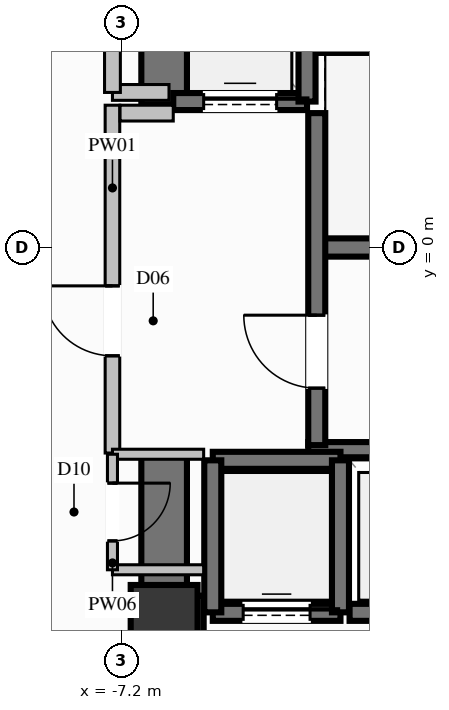
"""IFC4 building model, lengths in metres.
Left out: names, types, materials, properties, quantities, classifications, styles, units other than length and angle.
Written with IfcOpenShell. Run it as: python <this file> out.ifc"""

import sys

from ifc_helpers import new_model, si_unit, direction, frame, frame_2d, origin, origin_2d, place, context, subcontext, project, spatial, rectangle, extrude, element, fill, save


model = new_model("IFC4")
c1 = context("Model", 3, precision=1e-05, world=origin(), true_north=direction((0.0, 1.0)))
c2 = subcontext(c1, "Body", "Model", "MODEL_VIEW")
j1 = project(units=[si_unit("LENGTHUNIT", "METRE"), si_unit("PLANEANGLEUNIT", "RADIAN")], contexts=[c1])
p1 = place(None, origin())
s1 = spatial("IfcSite", under=j1, at=p1, CompositionType="ELEMENT")
p2 = place(p1, origin())
s2 = spatial("IfcBuilding", under=s1, at=p2, CompositionType="ELEMENT")
p3 = place(p2, frame((0.0, 0.0, 64.4)))
s3 = spatial("IfcBuildingStorey", under=s2, at=p3, CompositionType="ELEMENT", Elevation=64.4)
p4 = place(p3, frame((-6.5, -6.1, 0.0), z_axis=(0.0, 0.0, 1.0), x_axis=(1.0, 0.0, 0.0)))
e1 = element("IfcColumn", 1, at=p4, inside=s3, PredefinedType="COLUMN", context=c2, shape_type="SweptSolid", body=[
    extrude(rectangle(XDim=1.1, YDim=1.1, at=origin_2d()), origin(), (0.0, 0.0, 1.0), 3.6),
])
p5 = place(p3, frame((-3.99, 0.0, 0.0), z_axis=(0.0, 0.0, 1.0), x_axis=(1.0, 0.0, 0.0)))
e2 = element("IfcWall", 2, at=p5, inside=s3, PredefinedType="SHEAR", context=c2, shape_type="SweptSolid", body=[
    extrude(rectangle(XDim=7.98, YDim=0.3, at=frame_2d((3.99, 0.0))), origin(), (0.0, 0.0, 1.0), 3.6),
])
for number, where, z_axis, x_axis in (
    (3, (-4.13, -3.325, 0.0), (0.0, 0.0, 1.0), (1.0, 0.0, 0.0)),
    (4, (-4.13, 3.325, 0.0), (0.0, 0.0, 1.0), (1.0, 0.0, 0.0)),
):
    element("IfcWall", number, at=place(p3, frame(where, z_axis=z_axis, x_axis=x_axis)), inside=s3, PredefinedType="SOLIDWALL", context=c2, shape_type="SweptSolid", body=[
        extrude(rectangle(XDim=8.26, YDim=0.25, at=frame_2d((4.13, 0.0))), origin(), (0.0, 0.0, 1.0), 3.6),
    ])
p6 = place(p3, frame((-6.125, -6.1, 0.0), z_axis=(0.0, 0.0, 1.0), x_axis=(1.0, 0.0, 0.0)))
e5 = element("IfcWall", 5, at=p6, inside=s3, PredefinedType="SHEAR", context=c2, shape_type="SweptSolid", body=[
    extrude(rectangle(XDim=0.275, YDim=0.75, at=frame_2d((0.137, 0.0))), origin(), (0.0, 0.0, 1.0), 3.6),
])
p7 = place(p3, frame((-6.5, 2.35, 0.0), z_axis=(0.0, 0.0, 1.0), x_axis=(0.0, 1.0, 0.0)))
e6 = element("IfcWall", 6, at=p7, inside=s3, PredefinedType="SHEAR", context=c2, shape_type="SweptSolid", body=[
    extrude(rectangle(XDim=4.125, YDim=0.75, at=frame_2d((2.062, 0.0))), origin(), (0.0, 0.0, 1.0), 3.6),
])
p8 = place(p3, frame((-6.5, -6.475, 0.0), z_axis=(0.0, 0.0, 1.0), x_axis=(0.0, 1.0, 0.0)))
e7 = element("IfcWall", 7, at=p8, inside=s3, PredefinedType="SHEAR", context=c2, shape_type="SweptSolid", body=[
    extrude(rectangle(XDim=3.125, YDim=0.75, at=frame_2d((1.562, 0.0))), origin(), (0.0, 0.0, 1.0), 3.6),
])
p9 = place(p3, frame((-5.7, -6.0, 0.0), z_axis=(0.0, 0.0, 1.0), x_axis=(1.0, 0.0, 0.0)))
e8 = element("IfcWall", 8, at=p9, inside=s3, PredefinedType="SOLIDWALL", context=c2, shape_type="SweptSolid", body=[
    extrude(rectangle(XDim=2.1, YDim=0.28, at=frame_2d((1.05, 0.0))), origin(), (0.0, 0.0, 1.0), 3.34),
])
p10 = place(p9, frame((0.5, 0.0, 0.0)))
e9 = element("IfcOpeningElement", 9, at=p10, cuts=e8, PredefinedType="OPENING", context=c2, shape_type="SweptSolid", body=[
    extrude(rectangle(XDim=1.1, YDim=2.2, at=frame_2d((0.55, 1.1))), frame((0.0, 0.15, 0.0), z_axis=(0.0, -1.0, 0.0), x_axis=(1.0, 0.0, 0.0)), (0.0, 0.0, 1.0), 0.3),
])
p11 = place(p3, frame((-3.6, -3.5, 0.0), z_axis=(0.0, 0.0, 1.0), x_axis=(-1.0, 0.0, 0.0)))
e10 = element("IfcWall", 10, at=p11, inside=s3, PredefinedType="SOLIDWALL", context=c2, shape_type="SweptSolid", body=[
    extrude(rectangle(XDim=2.1, YDim=0.28, at=frame_2d((1.05, 0.0))), origin(), (0.0, 0.0, 1.0), 3.34),
])
for number, where, z_axis, x_axis in (
    (11, (-5.7, -3.5, 0.0), (0.0, 0.0, 1.0), (0.0, -1.0, 0.0)),
    (12, (-3.6, -6.0, 0.0), (0.0, 0.0, 1.0), (0.0, 1.0, 0.0)),
):
    element("IfcWall", number, at=place(p3, frame(where, z_axis=z_axis, x_axis=x_axis)), inside=s3, PredefinedType="SOLIDWALL", context=c2, shape_type="SweptSolid", body=[
        extrude(rectangle(XDim=2.5, YDim=0.28, at=frame_2d((1.25, 0.0))), origin(), (0.0, 0.0, 1.0), 3.34),
    ])
p12 = place(p3, frame((-3.45, -6.0, 0.0), z_axis=(0.0, 0.0, 1.0), x_axis=(1.0, 0.0, 0.0)))
e13 = element("IfcWall", 13, at=p12, inside=s3, PredefinedType="SOLIDWALL", context=c2, shape_type="SweptSolid", body=[
    extrude(rectangle(XDim=2.1, YDim=0.28, at=frame_2d((1.05, 0.0))), origin(), (0.0, 0.0, 1.0), 3.34),
])
p13 = place(p12, frame((0.5, 0.0, 0.0)))
e14 = element("IfcOpeningElement", 14, at=p13, cuts=e13, PredefinedType="OPENING", context=c2, shape_type="SweptSolid", body=[
    extrude(rectangle(XDim=1.1, YDim=2.2, at=frame_2d((0.55, 1.1))), frame((0.0, 0.15, 0.0), z_axis=(0.0, -1.0, 0.0), x_axis=(1.0, 0.0, 0.0)), (0.0, 0.0, 1.0), 0.3),
])
p14 = place(p3, frame((-6.35, 2.4, 0.0), z_axis=(0.0, 0.0, 1.0), x_axis=(1.0, 0.0, 0.0)))
e15 = element("IfcWall", 15, at=p14, inside=s3, PredefinedType="SOLIDWALL", context=c2, shape_type="SweptSolid", body=[
    extrude(rectangle(XDim=2.2, YDim=0.28, at=frame_2d((1.1, 0.0))), origin(), (0.0, 0.0, 1.0), 3.34),
])
p15 = place(p14, frame((0.5, 0.0, 0.0)))
e16 = element("IfcOpeningElement", 16, at=p15, cuts=e15, PredefinedType="OPENING", context=c2, shape_type="SweptSolid", body=[
    extrude(rectangle(XDim=1.2, YDim=2.2, at=frame_2d((0.6, 1.1))), frame((0.0, 0.15, 0.0), z_axis=(0.0, -1.0, 0.0), x_axis=(1.0, 0.0, 0.0)), (0.0, 0.0, 1.0), 0.3),
])
p16 = place(p3, frame((-4.15, 2.4, 0.0), z_axis=(0.0, 0.0, 1.0), x_axis=(0.0, 1.0, 0.0)))
e17 = element("IfcWall", 17, at=p16, inside=s3, PredefinedType="SOLIDWALL", context=c2, shape_type="SweptSolid", body=[
    extrude(rectangle(XDim=2.7, YDim=0.28, at=frame_2d((1.35, 0.0))), origin(), (0.0, 0.0, 1.0), 3.34),
])
p17 = place(p3, frame((-3.99, -3.25, 0.0), z_axis=(0.0, 0.0, 1.0), x_axis=(0.0, 1.0, 0.0)))
e18 = element("IfcWall", 18, at=p17, inside=s3, PredefinedType="SOLIDWALL", context=c2, shape_type="SweptSolid", body=[
    extrude(rectangle(XDim=5.46, YDim=0.28, at=frame_2d((2.73, 0.0))), origin(), (0.0, 0.0, 1.0), 3.34),
])
p18 = place(p17, frame((0.937, 0.0, 0.0)))
e19 = element("IfcOpeningElement", 19, at=p18, cuts=e18, PredefinedType="OPENING", context=c2, shape_type="SweptSolid", body=[
    extrude(rectangle(XDim=1.2, YDim=2.2, at=frame_2d((0.6, 1.1))), frame((0.0, 0.15, 0.0), z_axis=(0.0, -1.0, 0.0), x_axis=(1.0, 0.0, 0.0)), (0.0, 0.0, 1.0), 0.3),
])
p19 = place(p3, frame((-7.35, -3.38, 0.0), z_axis=(0.0, 0.0, 1.0), x_axis=(0.0, 1.0, 0.0)))
e20 = element("IfcWall", 20, at=p19, inside=s3, PredefinedType="PARTITIONING", context=c2, shape_type="SweptSolid", body=[
    extrude(rectangle(XDim=5.72, YDim=0.24, at=frame_2d((2.86, 0.0))), origin(), (0.0, 0.0, 1.0), 2.425),
])
p20 = place(p19, frame((1.599, 0.0, 0.0)))
e21 = element("IfcOpeningElement", 21, at=p20, cuts=e20, PredefinedType="OPENING", context=c2, shape_type="SweptSolid", body=[
    extrude(rectangle(XDim=1.15, YDim=2.2, at=frame_2d((0.575, 1.1))), frame((0.0, 0.13, 0.0), z_axis=(0.0, -1.0, 0.0), x_axis=(1.0, 0.0, 0.0)), (0.0, 0.0, 1.0), 0.26),
])
p21 = place(p3, frame((-7.225, 2.21, 0.0), z_axis=(0.0, 0.0, 1.0), x_axis=(1.0, 0.0, 0.0)))
e22 = element("IfcWall", 22, at=p21, inside=s3, PredefinedType="PARTITIONING", context=c2, shape_type="SweptSolid", body=[
    extrude(rectangle(XDim=0.875, YDim=0.26, at=frame_2d((0.438, 0.0))), origin(), (0.0, 0.0, 1.0), 3.34),
])
p22 = place(p3, frame((-7.35, 2.55, 0.0), z_axis=(0.0, 0.0, 1.0), x_axis=(1.0, 0.0, 0.0)))
e23 = element("IfcWall", 23, at=p22, inside=s3, PredefinedType="PARTITIONING", context=c2, shape_type="SweptSolid", body=[
    extrude(rectangle(XDim=0.93, YDim=0.26, at=frame_2d((0.465, 0.0))), origin(), (0.0, 0.0, 1.0), 3.34),
])
p23 = place(p3, frame((-7.35, 2.55, 0.0), z_axis=(0.0, 0.0, 1.0), x_axis=(0.0, 1.0, 0.0)))
e24 = element("IfcWall", 24, at=p23, inside=s3, PredefinedType="PARTITIONING", context=c2, shape_type="SweptSolid", body=[
    extrude(rectangle(XDim=2.4, YDim=0.26, at=frame_2d((1.2, 0.0))), origin(), (0.0, 0.0, 1.0), 2.425),
])
p24 = place(p23, frame((0.775, 0.0, 0.0)))
e25 = element("IfcOpeningElement", 25, at=p24, cuts=e24, PredefinedType="OPENING", context=c2, shape_type="SweptSolid", body=[
    extrude(rectangle(XDim=0.85, YDim=2.05, at=frame_2d((0.425, 1.025))), frame((0.0, 0.14, 0.0), z_axis=(0.0, -1.0, 0.0), x_axis=(1.0, 0.0, 0.0)), (0.0, 0.0, 1.0), 0.28),
])
p25 = place(p3, frame((-7.35, -5.3, 0.0), z_axis=(0.0, 0.0, 1.0), x_axis=(1.0, 0.0, 0.0)))
e26 = element("IfcWall", 26, at=p25, inside=s3, PredefinedType="PARTITIONING", context=c2, shape_type="SweptSolid", body=[
    extrude(rectangle(XDim=1.5, YDim=0.165, at=frame_2d((0.75, 0.0))), origin(), (0.0, 0.0, 1.0), 2.425),
])
p26 = place(p3, frame((-5.85, -3.4, 0.0), z_axis=(0.0, 0.0, 1.0), x_axis=(-1.0, 0.0, 0.0)))
e27 = element("IfcWall", 27, at=p26, inside=s3, PredefinedType="PARTITIONING", context=c2, shape_type="SweptSolid", body=[
    extrude(rectangle(XDim=1.5, YDim=0.165, at=frame_2d((0.75, 0.0))), origin(), (0.0, 0.0, 1.0), 3.34),
])
p27 = place(p3, frame((-7.35, -3.4, 0.0), z_axis=(0.0, 0.0, 1.0), x_axis=(0.0, -1.0, 0.0)))
e28 = element("IfcWall", 28, at=p27, inside=s3, PredefinedType="PARTITIONING", context=c2, shape_type="SweptSolid", body=[
    extrude(rectangle(XDim=1.9, YDim=0.165, at=frame_2d((0.95, 0.0))), origin(), (0.0, 0.0, 1.0), 3.34),
])
p28 = place(p27, frame((0.475, 0.0, 0.0)))
e29 = element("IfcOpeningElement", 29, at=p28, cuts=e28, PredefinedType="OPENING", context=c2, shape_type="SweptSolid", body=[
    extrude(rectangle(XDim=0.95, YDim=2.1, at=frame_2d((0.475, 1.05))), frame((0.0, 0.093, 0.0), z_axis=(0.0, -1.0, 0.0), x_axis=(1.0, 0.0, 0.0)), (0.0, 0.0, 1.0), 0.185),
])
p29 = place(p10, origin())
e30 = element("IfcDoor", 30, at=p29, inside=s3, OperationType="SLIDING_TO_LEFT", PredefinedType="DOOR", context=c2, shape_type="SweptSolid", body=[
    extrude(rectangle(XDim=1.1, YDim=2.2, at=frame_2d((0.55, 1.1))), frame((0.0, 0.025, 0.0), z_axis=(0.0, -1.0, 0.0), x_axis=(1.0, 0.0, 0.0)), (0.0, 0.0, 1.0), 0.05),
])
fill(e9, e30)
p30 = place(p15, origin())
e31 = element("IfcDoor", 31, at=p30, inside=s3, OperationType="SLIDING_TO_LEFT", PredefinedType="DOOR", context=c2, shape_type="SweptSolid", body=[
    extrude(rectangle(XDim=1.2, YDim=2.2, at=frame_2d((0.6, 1.1))), frame((0.0, 0.025, 0.0), z_axis=(0.0, -1.0, 0.0), x_axis=(1.0, 0.0, 0.0)), (0.0, 0.0, 1.0), 0.05),
])
fill(e16, e31)
p31 = place(p18, origin())
e32 = element("IfcDoor", 32, at=p31, inside=s3, OperationType="SINGLE_SWING_RIGHT", PredefinedType="DOOR", context=c2, shape_type="SweptSolid", body=[
    extrude(rectangle(XDim=1.2, YDim=2.2, at=frame_2d((0.6, 1.1))), frame((0.0, 0.025, 0.0), z_axis=(0.0, -1.0, 0.0), x_axis=(1.0, 0.0, 0.0)), (0.0, 0.0, 1.0), 0.05),
])
fill(e19, e32)
p32 = place(p20, origin())
e33 = element("IfcDoor", 33, at=p32, inside=s3, OperationType="SINGLE_SWING_RIGHT", PredefinedType="DOOR", context=c2, shape_type="SweptSolid", body=[
    extrude(rectangle(XDim=1.15, YDim=2.2, at=frame_2d((0.575, 1.1))), frame((0.0, 0.025, 0.0), z_axis=(0.0, -1.0, 0.0), x_axis=(1.0, 0.0, 0.0)), (0.0, 0.0, 1.0), 0.05),
])
fill(e21, e33)
p33 = place(p28, origin())
e34 = element("IfcDoor", 34, at=p33, inside=s3, OperationType="SINGLE_SWING_LEFT", PredefinedType="DOOR", context=c2, shape_type="SweptSolid", body=[
    extrude(rectangle(XDim=0.95, YDim=2.1, at=frame_2d((0.475, 1.05))), frame((0.0, 0.025, 0.0), z_axis=(0.0, -1.0, 0.0), x_axis=(1.0, 0.0, 0.0)), (0.0, 0.0, 1.0), 0.05),
])
fill(e29, e34)
save(model, sys.argv[1])
